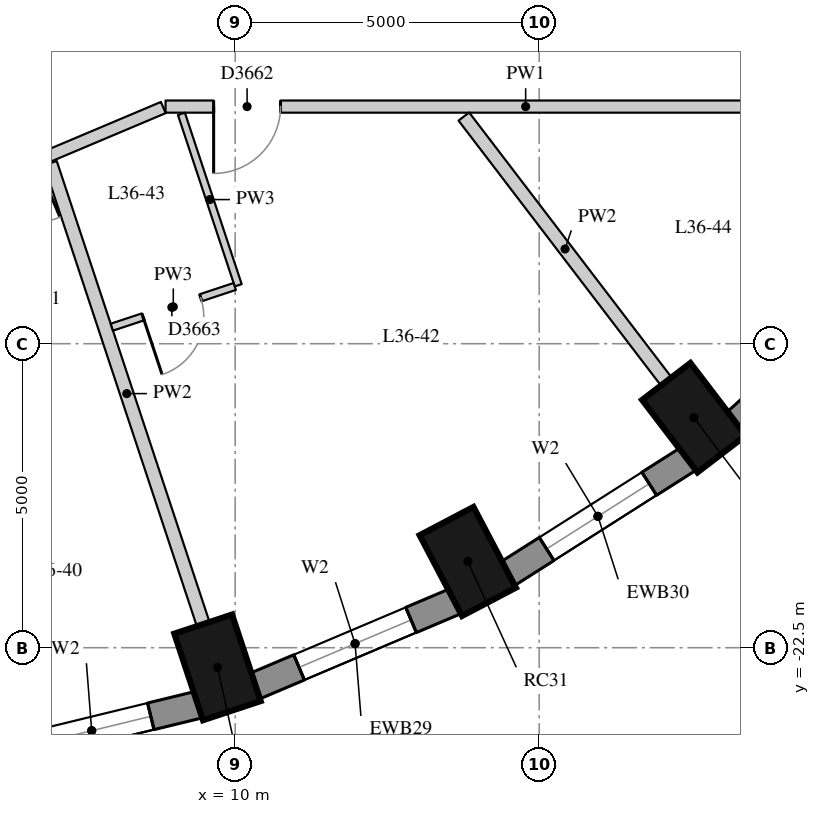
"""IFC4 building model, lengths in metres.
Left out: names, types, materials, properties, quantities, classifications, styles, units other than length and angle.
Written with IfcOpenShell. Run it as: python <this file> out.ifc"""

import sys

from ifc_helpers import new_model, si_unit, direction, frame, frame_2d, origin, origin_2d, place, context, subcontext, project, spatial, rectangle, extrude, element, fill, save


model = new_model("IFC4")
c1 = context("Model", 3, precision=1e-05, world=origin(), true_north=direction((0.0, 1.0)))
c2 = subcontext(c1, "Body", "Model", "MODEL_VIEW")
j1 = project(units=[si_unit("LENGTHUNIT", "METRE"), si_unit("PLANEANGLEUNIT", "RADIAN")], contexts=[c1])
p1 = place(None, origin())
s1 = spatial("IfcSite", under=j1, at=p1, CompositionType="ELEMENT")
p2 = place(p1, origin())
s2 = spatial("IfcBuilding", under=s1, at=p2, CompositionType="ELEMENT")
p3 = place(p2, frame((0.0, 0.0, 128.5)))
s3 = spatial("IfcBuildingStorey", under=s2, at=p3, CompositionType="ELEMENT", Elevation=128.5)
for number, where, z_axis, x_axis in (
    (1, (9.71, -22.824, 0.0), (0.0, 0.0, 1.0), (0.315, -0.949, 0.0)),
    (2, (13.825, -21.082, 0.0), (0.0, 0.0, 1.0), (0.465, -0.885, 0.0)),
    (3, (17.545, -18.717, 0.0), (0.0, 0.0, 1.0), (0.607, -0.795, 0.0)),
):
    element("IfcColumn", number, at=place(p3, frame(where, z_axis=z_axis, x_axis=x_axis)), inside=s3, PredefinedType="COLUMN", context=c2, shape_type="SweptSolid", body=[
        extrude(rectangle(XDim=1.5, YDim=1.0, at=origin_2d()), origin(), (0.0, 0.0, 1.0), 3.3),
    ])
p4 = place(p3, frame((5.875, -24.294, 0.0), z_axis=(0.0, 0.0, 1.0), x_axis=(0.971667603162, 0.236351579148, 0.0)))
e4 = element("IfcWall", 4, at=p4, inside=s3, PredefinedType="SOLIDWALL", context=c2, shape_type="SweptSolid", body=[
    extrude(rectangle(XDim=3.635, YDim=0.45, at=frame_2d((1.817, 0.0))), origin(), (0.0, 0.0, 1.0), 3.02),
])
p5 = place(p4, frame((0.817, 0.0, 0.4)))
e5 = element("IfcOpeningElement", 5, at=p5, cuts=e4, PredefinedType="OPENING", context=c2, shape_type="SweptSolid", body=[
    extrude(rectangle(XDim=2.0, YDim=1.75, at=frame_2d((1.0, 0.875))), frame((0.0, 0.235, 0.0), z_axis=(0.0, -1.0, 0.0), x_axis=(1.0, 0.0, 0.0)), (0.0, 0.0, 1.0), 0.47),
])
p6 = place(p3, frame((10.318, -23.134, 0.0), z_axis=(0.0, 0.0, 1.0), x_axis=(0.920869643542, 0.389870619055, 0.0)))
e6 = element("IfcWall", 6, at=p6, inside=s3, PredefinedType="SOLIDWALL", context=c2, shape_type="SweptSolid", body=[
    extrude(rectangle(XDim=3.591, YDim=0.45, at=frame_2d((1.796, 0.0))), origin(), (0.0, 0.0, 1.0), 3.02),
])
p7 = place(p6, frame((0.796, 0.0, 0.4)))
e7 = element("IfcOpeningElement", 7, at=p7, cuts=e6, PredefinedType="OPENING", context=c2, shape_type="SweptSolid", body=[
    extrude(rectangle(XDim=2.0, YDim=1.75, at=frame_2d((1.0, 0.875))), frame((0.0, 0.235, 0.0), z_axis=(0.0, -1.0, 0.0), x_axis=(1.0, 0.0, 0.0)), (0.0, 0.0, 1.0), 0.47),
])
p8 = place(p3, frame((14.475, -21.287, 0.0), z_axis=(0.0, 0.0, 1.0), x_axis=(0.843911841423, 0.536481876587, 0.0)))
e8 = element("IfcWall", 8, at=p8, inside=s3, PredefinedType="SOLIDWALL", context=c2, shape_type="SweptSolid", body=[
    extrude(rectangle(XDim=3.532, YDim=0.45, at=frame_2d((1.766, 0.0))), origin(), (0.0, 0.0, 1.0), 3.02),
])
p9 = place(p8, frame((0.766, 0.0, 0.4)))
e9 = element("IfcOpeningElement", 9, at=p9, cuts=e8, PredefinedType="OPENING", context=c2, shape_type="SweptSolid", body=[
    extrude(rectangle(XDim=2.0, YDim=1.75, at=frame_2d((1.0, 0.875))), frame((0.0, 0.235, 0.0), z_axis=(0.0, -1.0, 0.0), x_axis=(1.0, 0.0, 0.0)), (0.0, 0.0, 1.0), 0.47),
])
p10 = place(p3, frame((18.219, -18.81, 0.0), z_axis=(0.0, 0.0, 1.0), x_axis=(0.740364106106, 0.672206062446, 0.0)))
e10 = element("IfcWall", 10, at=p10, inside=s3, PredefinedType="SOLIDWALL", context=c2, shape_type="SweptSolid", body=[
    extrude(rectangle(XDim=3.464, YDim=0.45, at=frame_2d((1.732, 0.0))), origin(), (0.0, 0.0, 1.0), 3.02),
])
p11 = place(p3, frame((20.7, -13.6, 0.0), z_axis=(0.0, 0.0, 1.0), x_axis=(-1.0, 0.0, 0.0)))
e11 = element("IfcWall", 11, at=p11, inside=s3, PredefinedType="PARTITIONING", context=c2, shape_type="SweptSolid", body=[
    extrude(rectangle(XDim=11.845, YDim=0.2, at=frame_2d((5.923, 0.0))), origin(), (0.0, 0.0, 1.0), 3.02),
])
p12 = place(p11, frame((9.954, 0.0, 0.0)))
e12 = element("IfcOpeningElement", 12, at=p12, cuts=e11, PredefinedType="OPENING", context=c2, shape_type="SweptSolid", body=[
    extrude(rectangle(XDim=1.1, YDim=2.1, at=frame_2d((0.55, 1.05))), frame((0.0, 0.11, 0.0), z_axis=(0.0, -1.0, 0.0), x_axis=(1.0, 0.0, 0.0)), (0.0, 0.0, 1.0), 0.22),
])
p13 = place(p3, frame((8.818, -13.616, 0.0), z_axis=(0.0, 0.0, 1.0), x_axis=(-0.921304705085, -0.388841407759, 0.0)))
e13 = element("IfcWall", 13, at=p13, inside=s3, PredefinedType="PARTITIONING", context=c2, shape_type="SweptSolid", body=[
    extrude(rectangle(XDim=5.217, YDim=0.2, at=frame_2d((2.608, 0.0))), origin(), (0.0, 0.0, 1.0), 3.02),
])
p14 = place(p13, frame((2.266, 0.0, 0.0)))
e14 = element("IfcOpeningElement", 14, at=p14, cuts=e13, PredefinedType="OPENING", context=c2, shape_type="SweptSolid", body=[
    extrude(rectangle(XDim=1.0, YDim=2.1, at=frame_2d((0.5, 1.05))), frame((0.0, 0.11, 0.0), z_axis=(0.0, -1.0, 0.0), x_axis=(1.0, 0.0, 0.0)), (0.0, 0.0, 1.0), 0.22),
])
p15 = place(p3, frame((9.474, -22.112, 0.0), z_axis=(0.0, 0.0, 1.0), x_axis=(-0.314540101072, 0.949244186086, 0.0)))
e15 = element("IfcWall", 15, at=p15, inside=s3, PredefinedType="PARTITIONING", context=c2, shape_type="SweptSolid", body=[
    extrude(rectangle(XDim=7.988, YDim=0.22, at=frame_2d((3.994, 0.0))), origin(), (0.0, 0.0, 1.0), 3.02),
])
p16 = place(p3, frame((17.089, -18.121, 0.0), z_axis=(0.0, 0.0, 1.0), x_axis=(-0.607064955951, 0.794652212767, 0.0)))
e16 = element("IfcWall", 16, at=p16, inside=s3, PredefinedType="PARTITIONING", context=c2, shape_type="SweptSolid", body=[
    extrude(rectangle(XDim=5.483, YDim=0.22, at=frame_2d((2.742, 0.0))), origin(), (0.0, 0.0, 1.0), 3.02),
])
p17 = place(p3, frame((9.116, -13.719, 0.0), z_axis=(0.0, 0.0, 1.0), x_axis=(0.314476938086, -0.949265113344, 0.0)))
e17 = element("IfcWall", 17, at=p17, inside=s3, PredefinedType="PARTITIONING", context=c2, shape_type="SweptSolid", body=[
    extrude(rectangle(XDim=2.971, YDim=0.12, at=frame_2d((1.485, 0.0))), origin(), (0.0, 0.0, 1.0), 3.02),
])
p18 = place(p3, frame((9.993, -16.559, 0.0), z_axis=(0.0, 0.0, 1.0), x_axis=(-0.94926636949, -0.314473146318, 0.0)))
e18 = element("IfcWall", 18, at=p18, inside=s3, PredefinedType="PARTITIONING", context=c2, shape_type="SweptSolid", body=[
    extrude(rectangle(XDim=2.13, YDim=0.12, at=frame_2d((1.065, 0.0))), origin(), (0.0, 0.0, 1.0), 3.02),
])
p19 = place(p18, frame((0.59, 0.0, 0.0)))
e19 = element("IfcOpeningElement", 19, at=p19, cuts=e18, PredefinedType="OPENING", context=c2, shape_type="SweptSolid", body=[
    extrude(rectangle(XDim=1.0, YDim=2.1, at=frame_2d((0.5, 1.05))), frame((0.0, 0.07, 0.0), z_axis=(0.0, -1.0, 0.0), x_axis=(1.0, 0.0, 0.0)), (0.0, 0.0, 1.0), 0.14),
])
p20 = place(p5, origin())
e20 = element("IfcWindow", 20, at=p20, inside=s3, PartitioningType="SINGLE_PANEL", PredefinedType="WINDOW", context=c2, shape_type="SweptSolid", body=[
    extrude(rectangle(XDim=2.0, YDim=1.75, at=frame_2d((1.0, 0.875))), frame((0.0, 0.035, 0.0), z_axis=(0.0, -1.0, 0.0), x_axis=(1.0, 0.0, 0.0)), (0.0, 0.0, 1.0), 0.06),
])
fill(e5, e20)
p21 = place(p7, origin())
e21 = element("IfcWindow", 21, at=p21, inside=s3, PartitioningType="SINGLE_PANEL", PredefinedType="WINDOW", context=c2, shape_type="SweptSolid", body=[
    extrude(rectangle(XDim=2.0, YDim=1.75, at=frame_2d((1.0, 0.875))), frame((0.0, 0.035, 0.0), z_axis=(0.0, -1.0, 0.0), x_axis=(1.0, 0.0, 0.0)), (0.0, 0.0, 1.0), 0.06),
])
fill(e7, e21)
p22 = place(p9, origin())
e22 = element("IfcWindow", 22, at=p22, inside=s3, PartitioningType="SINGLE_PANEL", PredefinedType="WINDOW", context=c2, shape_type="SweptSolid", body=[
    extrude(rectangle(XDim=2.0, YDim=1.75, at=frame_2d((1.0, 0.875))), frame((0.0, 0.035, 0.0), z_axis=(0.0, -1.0, 0.0), x_axis=(1.0, 0.0, 0.0)), (0.0, 0.0, 1.0), 0.06),
])
fill(e9, e22)
p23 = place(p12, origin())
e23 = element("IfcDoor", 23, at=p23, inside=s3, OperationType="SINGLE_SWING_RIGHT", PredefinedType="DOOR", context=c2, shape_type="SweptSolid", body=[
    extrude(rectangle(XDim=1.1, YDim=2.1, at=frame_2d((0.55, 1.05))), frame((0.0, 0.025, 0.0), z_axis=(0.0, -1.0, 0.0), x_axis=(1.0, 0.0, 0.0)), (0.0, 0.0, 1.0), 0.05),
])
fill(e12, e23)
p24 = place(p19, origin())
e24 = element("IfcDoor", 24, at=p24, inside=s3, OperationType="SINGLE_SWING_RIGHT", PredefinedType="DOOR", context=c2, shape_type="SweptSolid", body=[
    extrude(rectangle(XDim=1.0, YDim=2.1, at=frame_2d((0.5, 1.05))), frame((0.0, 0.025, 0.0), z_axis=(0.0, -1.0, 0.0), x_axis=(1.0, 0.0, 0.0)), (0.0, 0.0, 1.0), 0.05),
])
fill(e19, e24)
save(model, sys.argv[1])
